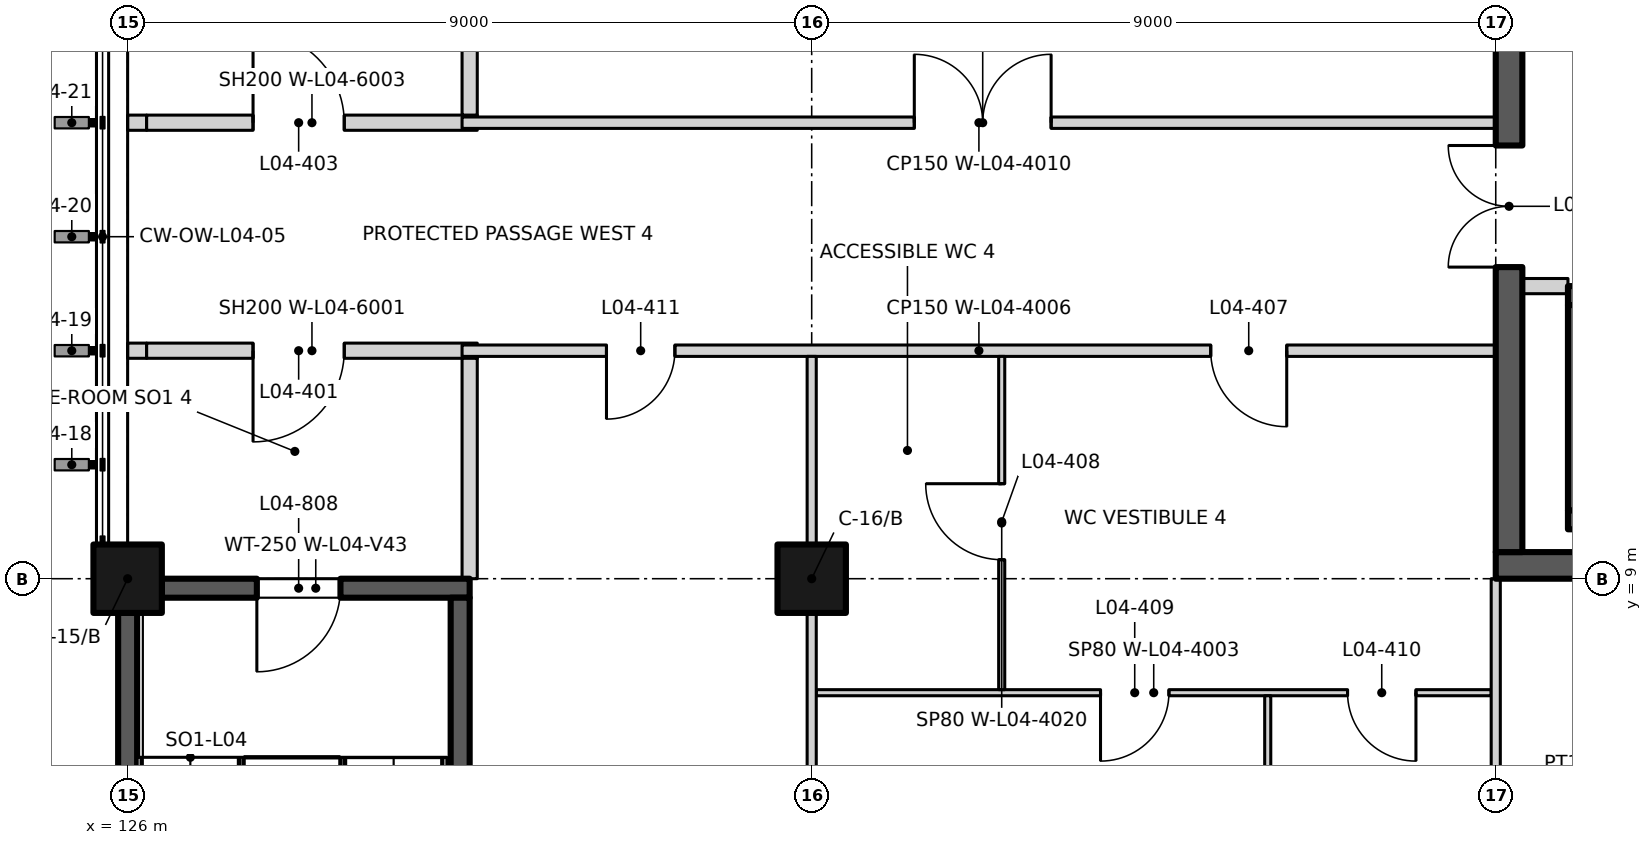
"""IFC4 building model, lengths in metres.
Left out: names, types, materials, properties, quantities, classifications, styles, units other than length and angle.
Written with IfcOpenShell. Run it as: python <this file> out.ifc"""

import sys

from ifc_helpers import new_model, si_unit, direction, frame, frame_2d, origin, origin_2d, place, context, subcontext, project, spatial, rectangle, extrude, element, fill, save


model = new_model("IFC4")
c1 = context("Model", 3, precision=1e-05, world=origin(), true_north=direction((0.0, 1.0)))
c2 = subcontext(c1, "Body", "Model", "MODEL_VIEW")
j1 = project(units=[si_unit("LENGTHUNIT", "METRE"), si_unit("PLANEANGLEUNIT", "RADIAN")], contexts=[c1])
p1 = place(None, origin())
s1 = spatial("IfcSite", under=j1, at=p1, CompositionType="ELEMENT")
p2 = place(p1, origin())
s2 = spatial("IfcBuilding", under=s1, at=p2, CompositionType="ELEMENT")
p3 = place(p2, frame((0.0, 0.0, 19.5)))
s3 = spatial("IfcBuildingStorey", under=s2, at=p3, CompositionType="ELEMENT", Elevation=19.5)
for number, where, z_axis, x_axis in (
    (1, (126.0, 9.0, 0.0), (0.0, 0.0, 1.0), (1.0, 0.0, 0.0)),
    (2, (135.0, 9.0, 0.0), (0.0, 0.0, 1.0), (1.0, 0.0, 0.0)),
):
    element("IfcColumn", number, at=place(p3, frame(where, z_axis=z_axis, x_axis=x_axis)), inside=s3, PredefinedType="COLUMN", context=c2, shape_type="SweptSolid", body=[
        extrude(rectangle(XDim=0.9, YDim=0.9, at=origin_2d()), origin(), (0.0, 0.0, 1.0), 4.5),
    ])
p4 = place(p3, frame((126.45, 8.875, 0.0), z_axis=(0.0, 0.0, 1.0), x_axis=(1.0, 0.0, 0.0)))
e3 = element("IfcWall", 3, at=p4, inside=s3, PredefinedType="SHEAR", context=c2, shape_type="SweptSolid", body=[
    extrude(rectangle(XDim=4.05, YDim=0.25, at=frame_2d((2.025, 0.0))), origin(), (0.0, 0.0, 1.0), 4.5),
])
p5 = place(p4, frame((2.35, 0.0, 0.0), z_axis=(0.0, 0.0, 1.0), x_axis=(-1.0, 0.0, 0.0)))
e4 = element("IfcOpeningElement", 4, at=p5, cuts=e3, PredefinedType="OPENING", context=c2, shape_type="SweptSolid", body=[
    extrude(rectangle(XDim=1.1, YDim=2.1, at=frame_2d((0.55, 1.05))), frame((0.0, 0.135, 0.0), z_axis=(0.0, -1.0, 0.0), x_axis=(1.0, 0.0, 0.0)), (0.0, 0.0, 1.0), 0.27),
])
p6 = place(p3, frame((126.0, 0.45, 0.0), z_axis=(0.0, 0.0, 1.0), x_axis=(0.0, 1.0, 0.0)))
e5 = element("IfcWall", 5, at=p6, inside=s3, PredefinedType="SHEAR", context=c2, shape_type="SweptSolid", body=[
    extrude(rectangle(XDim=8.1, YDim=0.25, at=frame_2d((4.05, 0.0))), origin(), (0.0, 0.0, 1.0), 4.5),
])
p7 = place(p3, frame((130.375, 0.125, 0.0), z_axis=(0.0, 0.0, 1.0), x_axis=(0.0, 1.0, 0.0)))
e6 = element("IfcWall", 6, at=p7, inside=s3, PredefinedType="SHEAR", context=c2, shape_type="SweptSolid", body=[
    extrude(rectangle(XDim=8.625, YDim=0.25, at=frame_2d((4.312, 0.0))), origin(), (0.0, 0.0, 1.0), 4.5),
])
p8 = place(p3, frame((144.95, 12.725, 0.0), z_axis=(0.0, 0.0, 1.0), x_axis=(1.0, 0.0, 0.0)))
e7 = element("IfcWall", 7, at=p8, inside=s3, PredefinedType="SHEAR", context=c2, shape_type="SweptSolid", body=[
    extrude(rectangle(XDim=12.05, YDim=0.25, at=frame_2d((6.025, 0.0))), origin(), (0.0, 0.0, 1.0), 4.5),
])
p9 = place(p8, frame((1.05, 0.0, 0.0)))
e8 = element("IfcOpeningElement", 8, at=p9, cuts=e7, PredefinedType="OPENING", context=c2, shape_type="SweptSolid", body=[
    extrude(rectangle(XDim=1.1, YDim=2.1, at=frame_2d((0.55, 1.05))), frame((0.0, 0.135, 0.0), z_axis=(0.0, -1.0, 0.0), x_axis=(1.0, 0.0, 0.0)), (0.0, 0.0, 1.0), 0.27),
])
p10 = place(p8, frame((4.0, 0.0, 0.0)))
e9 = element("IfcOpeningElement", 9, at=p10, cuts=e7, PredefinedType="OPENING", context=c2, shape_type="SweptSolid", body=[
    extrude(rectangle(XDim=1.1, YDim=2.1, at=frame_2d((0.55, 1.05))), frame((0.0, 0.135, 0.0), z_axis=(0.0, -1.0, 0.0), x_axis=(1.0, 0.0, 0.0)), (0.0, 0.0, 1.0), 0.27),
])
p11 = place(p8, frame((6.95, 0.0, 0.0)))
e10 = element("IfcOpeningElement", 10, at=p11, cuts=e7, PredefinedType="OPENING", context=c2, shape_type="SweptSolid", body=[
    extrude(rectangle(XDim=1.1, YDim=2.1, at=frame_2d((0.55, 1.05))), frame((0.0, 0.135, 0.0), z_axis=(0.0, -1.0, 0.0), x_axis=(1.0, 0.0, 0.0)), (0.0, 0.0, 1.0), 0.27),
])
p12 = place(p8, frame((9.9, 0.0, 0.0)))
e11 = element("IfcOpeningElement", 11, at=p12, cuts=e7, PredefinedType="OPENING", context=c2, shape_type="SweptSolid", body=[
    extrude(rectangle(XDim=1.1, YDim=2.1, at=frame_2d((0.55, 1.05))), frame((0.0, 0.135, 0.0), z_axis=(0.0, -1.0, 0.0), x_axis=(1.0, 0.0, 0.0)), (0.0, 0.0, 1.0), 0.27),
])
p13 = place(p3, frame((144.95, 9.775, 0.0), z_axis=(0.0, 0.0, 1.0), x_axis=(1.0, 0.0, 0.0)))
e12 = element("IfcWall", 12, at=p13, inside=s3, PredefinedType="SHEAR", context=c2, shape_type="SweptSolid", body=[
    extrude(rectangle(XDim=12.05, YDim=0.25, at=frame_2d((6.025, 0.0))), origin(), (0.0, 0.0, 1.0), 4.5),
])
p14 = place(p3, frame((145.075, 9.9, 0.0), z_axis=(0.0, 0.0, 1.0), x_axis=(0.0, 1.0, 0.0)))
e13 = element("IfcWall", 13, at=p14, inside=s3, PredefinedType="SHEAR", context=c2, shape_type="SweptSolid", body=[
    extrude(rectangle(XDim=2.7, YDim=0.25, at=frame_2d((1.35, 0.0))), origin(), (0.0, 0.0, 1.0), 4.5),
])
p15 = place(p3, frame((135.06, 7.5, 0.0), z_axis=(0.0, 0.0, 1.0), x_axis=(1.0, 0.0, 0.0)))
e14 = element("IfcWall", 14, at=p15, inside=s3, PredefinedType="PARTITIONING", context=c2, shape_type="SweptSolid", body=[
    extrude(rectangle(XDim=8.88, YDim=0.08, at=frame_2d((4.44, 0.0))), origin(), (0.0, 0.0, 1.0), 4.2),
])
p16 = place(p15, frame((4.64, 0.0, 0.0), z_axis=(0.0, 0.0, 1.0), x_axis=(-1.0, 0.0, 0.0)))
e15 = element("IfcOpeningElement", 15, at=p16, cuts=e14, PredefinedType="OPENING", context=c2, shape_type="SweptSolid", body=[
    extrude(rectangle(XDim=0.9, YDim=2.1, at=frame_2d((0.45, 1.05))), frame((0.0, 0.05, 0.0), z_axis=(0.0, -1.0, 0.0), x_axis=(1.0, 0.0, 0.0)), (0.0, 0.0, 1.0), 0.1),
])
p17 = place(p15, frame((7.89, 0.0, 0.0), z_axis=(0.0, 0.0, 1.0), x_axis=(-1.0, 0.0, 0.0)))
e16 = element("IfcOpeningElement", 16, at=p17, cuts=e14, PredefinedType="OPENING", context=c2, shape_type="SweptSolid", body=[
    extrude(rectangle(XDim=0.9, YDim=2.1, at=frame_2d((0.45, 1.05))), frame((0.0, 0.05, 0.0), z_axis=(0.0, -1.0, 0.0), x_axis=(1.0, 0.0, 0.0)), (0.0, 0.0, 1.0), 0.1),
])
p18 = place(p3, frame((144.0, 9.175, 0.0), z_axis=(0.0, 0.0, 1.0), x_axis=(1.0, 0.0, 0.0)))
e17 = element("IfcWall", 17, at=p18, inside=s3, PredefinedType="SHEAR", context=c2, shape_type="SweptSolid", body=[
    extrude(rectangle(XDim=18.0, YDim=0.35, at=frame_2d((9.0, 0.0))), origin(), (0.0, 0.0, 1.0), 4.2),
])
p19 = place(p18, frame((16.463, 0.0, 0.0), z_axis=(0.0, 0.0, 1.0), x_axis=(-1.0, 0.0, 0.0)))
e18 = element("IfcOpeningElement", 18, at=p19, cuts=e17, PredefinedType="OPENING", context=c2, shape_type="SweptSolid", body=[
    extrude(rectangle(XDim=2.1, YDim=2.4, at=frame_2d((1.05, 1.2))), frame((0.0, 0.185, 0.0), z_axis=(0.0, -1.0, 0.0), x_axis=(1.0, 0.0, 0.0)), (0.0, 0.0, 1.0), 0.37),
])
p20 = place(p3, frame((126.0, 12.0, 0.0), z_axis=(0.0, 0.0, 1.0), x_axis=(1.0, 0.0, 0.0)))
e19 = element("IfcWall", 19, at=p20, inside=s3, PredefinedType="PARTITIONING", context=c2, shape_type="SweptSolid", body=[
    extrude(rectangle(XDim=0.25, YDim=0.2, at=frame_2d((0.125, 0.0))), origin(), (0.0, 0.0, 1.0), 3.6),
])
p21 = place(p3, frame((126.25, 12.0, 0.0), z_axis=(0.0, 0.0, 1.0), x_axis=(1.0, 0.0, 0.0)))
e20 = element("IfcWall", 20, at=p21, inside=s3, PredefinedType="PARTITIONING", context=c2, shape_type="SweptSolid", body=[
    extrude(rectangle(XDim=4.35, YDim=0.2, at=frame_2d((2.175, 0.0))), origin(), (0.0, 0.0, 1.0), 4.2),
])
p22 = place(p21, frame((2.6, 0.0, 0.0), z_axis=(0.0, 0.0, 1.0), x_axis=(-1.0, 0.0, 0.0)))
e21 = element("IfcOpeningElement", 21, at=p22, cuts=e20, PredefinedType="OPENING", context=c2, shape_type="SweptSolid", body=[
    extrude(rectangle(XDim=1.2, YDim=2.1, at=frame_2d((0.6, 1.05))), frame((0.0, 0.11, 0.0), z_axis=(0.0, -1.0, 0.0), x_axis=(1.0, 0.0, 0.0)), (0.0, 0.0, 1.0), 0.22),
])
p23 = place(p3, frame((130.4, 12.0, 0.0), z_axis=(0.0, 0.0, 1.0), x_axis=(1.0, 0.0, 0.0)))
e22 = element("IfcWall", 22, at=p23, inside=s3, PredefinedType="PARTITIONING", context=c2, shape_type="SweptSolid", body=[
    extrude(rectangle(XDim=13.6, YDim=0.15, at=frame_2d((6.8, 0.0))), origin(), (0.0, 0.0, 1.0), 4.2),
])
p24 = place(p23, frame((10.85, 0.0, 0.0), z_axis=(0.0, 0.0, 1.0), x_axis=(-1.0, 0.0, 0.0)))
e23 = element("IfcOpeningElement", 23, at=p24, cuts=e22, PredefinedType="OPENING", context=c2, shape_type="SweptSolid", body=[
    extrude(rectangle(XDim=1.0, YDim=2.1, at=frame_2d((0.5, 1.05))), frame((0.0, 0.085, 0.0), z_axis=(0.0, -1.0, 0.0), x_axis=(1.0, 0.0, 0.0)), (0.0, 0.0, 1.0), 0.17),
])
p25 = place(p23, frame((2.8, 0.0, 0.0), z_axis=(0.0, 0.0, 1.0), x_axis=(-1.0, 0.0, 0.0)))
e24 = element("IfcOpeningElement", 24, at=p25, cuts=e22, PredefinedType="OPENING", context=c2, shape_type="SweptSolid", body=[
    extrude(rectangle(XDim=0.9, YDim=2.1, at=frame_2d((0.45, 1.05))), frame((0.0, 0.085, 0.0), z_axis=(0.0, -1.0, 0.0), x_axis=(1.0, 0.0, 0.0)), (0.0, 0.0, 1.0), 0.17),
])
p26 = place(p3, frame((144.35, 12.85, 0.0), z_axis=(0.0, 0.0, 1.0), x_axis=(1.0, 0.0, 0.0)))
e25 = element("IfcWall", 25, at=p26, inside=s3, PredefinedType="PARTITIONING", context=c2, shape_type="SweptSolid", body=[
    extrude(rectangle(XDim=0.6, YDim=0.2, at=frame_2d((0.3, 0.0))), origin(), (0.0, 0.0, 1.0), 4.2),
])
p27 = place(p3, frame((126.0, 15.0, 0.0), z_axis=(0.0, 0.0, 1.0), x_axis=(1.0, 0.0, 0.0)))
e26 = element("IfcWall", 26, at=p27, inside=s3, PredefinedType="PARTITIONING", context=c2, shape_type="SweptSolid", body=[
    extrude(rectangle(XDim=0.25, YDim=0.2, at=frame_2d((0.125, 0.0))), origin(), (0.0, 0.0, 1.0), 3.6),
])
p28 = place(p3, frame((126.25, 15.0, 0.0), z_axis=(0.0, 0.0, 1.0), x_axis=(1.0, 0.0, 0.0)))
e27 = element("IfcWall", 27, at=p28, inside=s3, PredefinedType="PARTITIONING", context=c2, shape_type="SweptSolid", body=[
    extrude(rectangle(XDim=4.35, YDim=0.2, at=frame_2d((2.175, 0.0))), origin(), (0.0, 0.0, 1.0), 4.2),
])
p29 = place(p28, frame((1.4, 0.0, 0.0)))
e28 = element("IfcOpeningElement", 28, at=p29, cuts=e27, PredefinedType="OPENING", context=c2, shape_type="SweptSolid", body=[
    extrude(rectangle(XDim=1.2, YDim=2.1, at=frame_2d((0.6, 1.05))), frame((0.0, 0.11, 0.0), z_axis=(0.0, -1.0, 0.0), x_axis=(1.0, 0.0, 0.0)), (0.0, 0.0, 1.0), 0.22),
])
p30 = place(p3, frame((130.4, 15.0, 0.0), z_axis=(0.0, 0.0, 1.0), x_axis=(1.0, 0.0, 0.0)))
e29 = element("IfcWall", 29, at=p30, inside=s3, PredefinedType="PARTITIONING", context=c2, shape_type="SweptSolid", body=[
    extrude(rectangle(XDim=13.6, YDim=0.15, at=frame_2d((6.8, 0.0))), origin(), (0.0, 0.0, 1.0), 4.2),
])
p31 = place(p30, frame((5.95, 0.0, 0.0)))
e30 = element("IfcOpeningElement", 30, at=p31, cuts=e29, PredefinedType="OPENING", context=c2, shape_type="SweptSolid", body=[
    extrude(rectangle(XDim=1.8, YDim=2.1, at=frame_2d((0.9, 1.05))), frame((0.0, 0.085, 0.0), z_axis=(0.0, -1.0, 0.0), x_axis=(1.0, 0.0, 0.0)), (0.0, 0.0, 1.0), 0.17),
])
for number, where, z_axis, x_axis in (
    (31, (130.5, 9.0, 0.0), (0.0, 0.0, 1.0), (0.0, 1.0, 0.0)),
    (32, (130.5, 15.1, 0.0), (0.0, 0.0, 1.0), (0.0, 1.0, 0.0)),
):
    element("IfcWall", number, at=place(p3, frame(where, z_axis=z_axis, x_axis=x_axis)), inside=s3, PredefinedType="PARTITIONING", context=c2, shape_type="SweptSolid", body=[
        extrude(rectangle(XDim=2.9, YDim=0.2, at=frame_2d((1.45, 0.0))), origin(), (0.0, 0.0, 1.0), 4.2),
    ])
p32 = place(p3, frame((135.0, 0.45, 0.0), z_axis=(0.0, 0.0, 1.0), x_axis=(0.0, 1.0, 0.0)))
e33 = element("IfcWall", 33, at=p32, inside=s3, PredefinedType="PARTITIONING", context=c2, shape_type="SweptSolid", body=[
    extrude(rectangle(XDim=8.1, YDim=0.12, at=frame_2d((4.05, 0.0))), origin(), (0.0, 0.0, 1.0), 4.2),
])
p33 = place(p3, frame((135.0, 9.45, 0.0), z_axis=(0.0, 0.0, 1.0), x_axis=(0.0, 1.0, 0.0)))
e34 = element("IfcWall", 34, at=p33, inside=s3, PredefinedType="PARTITIONING", context=c2, shape_type="SweptSolid", body=[
    extrude(rectangle(XDim=2.475, YDim=0.12, at=frame_2d((1.238, 0.0))), origin(), (0.0, 0.0, 1.0), 4.2),
])
p34 = place(p3, frame((137.5, 7.54, 0.0), z_axis=(0.0, 0.0, 1.0), x_axis=(0.0, 1.0, 0.0)))
e35 = element("IfcWall", 35, at=p34, inside=s3, PredefinedType="PARTITIONING", context=c2, shape_type="SweptSolid", body=[
    extrude(rectangle(XDim=4.385, YDim=0.08, at=frame_2d((2.192, 0.0))), origin(), (0.0, 0.0, 1.0), 4.2),
])
p35 = place(p34, frame((1.71, 0.0, 0.0)))
e36 = element("IfcOpeningElement", 36, at=p35, cuts=e35, PredefinedType="OPENING", context=c2, shape_type="SweptSolid", body=[
    extrude(rectangle(XDim=1.0, YDim=2.1, at=frame_2d((0.5, 1.05))), frame((0.0, 0.05, 0.0), z_axis=(0.0, -1.0, 0.0), x_axis=(1.0, 0.0, 0.0)), (0.0, 0.0, 1.0), 0.1),
])
p36 = place(p3, frame((141.0, 0.25, 0.0), z_axis=(0.0, 0.0, 1.0), x_axis=(0.0, 1.0, 0.0)))
e37 = element("IfcWall", 37, at=p36, inside=s3, PredefinedType="PARTITIONING", context=c2, shape_type="SweptSolid", body=[
    extrude(rectangle(XDim=7.21, YDim=0.08, at=frame_2d((3.605, 0.0))), origin(), (0.0, 0.0, 1.0), 4.2),
])
p37 = place(p3, frame((144.0, 0.45, 0.0), z_axis=(0.0, 0.0, 1.0), x_axis=(0.0, 1.0, 0.0)))
e38 = element("IfcWall", 38, at=p37, inside=s3, PredefinedType="PARTITIONING", context=c2, shape_type="SweptSolid", body=[
    extrude(rectangle(XDim=8.55, YDim=0.12, at=frame_2d((4.275, 0.0))), origin(), (0.0, 0.0, 1.0), 4.2),
])
p38 = place(p3, frame((144.175, 9.35, 0.0), z_axis=(0.0, 0.0, 1.0), x_axis=(0.0, 1.0, 0.0)))
e39 = element("IfcWall", 39, at=p38, inside=s3, PredefinedType="SHEAR", context=c2, shape_type="SweptSolid", body=[
    extrude(rectangle(XDim=17.4, YDim=0.35, at=frame_2d((8.7, 0.0))), origin(), (0.0, 0.0, 1.0), 4.2),
])
p39 = place(p38, frame((3.75, 0.0, 0.0)))
e40 = element("IfcOpeningElement", 40, at=p39, cuts=e39, PredefinedType="OPENING", context=c2, shape_type="SweptSolid", body=[
    extrude(rectangle(XDim=1.6, YDim=2.4, at=frame_2d((0.8, 1.2))), frame((0.0, 0.185, 0.0), z_axis=(0.0, -1.0, 0.0), x_axis=(1.0, 0.0, 0.0)), (0.0, 0.0, 1.0), 0.37),
])
p40 = place(p5, origin())
e41 = element("IfcDoor", 41, at=p40, inside=s3, OperationType="SINGLE_SWING_RIGHT", PredefinedType="DOOR", context=c2, shape_type="SweptSolid", body=[
    extrude(rectangle(XDim=1.1, YDim=2.1, at=frame_2d((0.55, 1.05))), frame((0.0, 0.025, 0.0), z_axis=(0.0, -1.0, 0.0), x_axis=(1.0, 0.0, 0.0)), (0.0, 0.0, 1.0), 0.05),
])
fill(e4, e41)
p41 = place(p22, origin())
e42 = element("IfcDoor", 42, at=p41, inside=s3, OperationType="SINGLE_SWING_RIGHT", PredefinedType="DOOR", context=c2, shape_type="SweptSolid", body=[
    extrude(rectangle(XDim=1.2, YDim=2.1, at=frame_2d((0.6, 1.05))), frame((0.0, 0.025, 0.0), z_axis=(0.0, -1.0, 0.0), x_axis=(1.0, 0.0, 0.0)), (0.0, 0.0, 1.0), 0.05),
])
fill(e21, e42)
p42 = place(p29, origin())
e43 = element("IfcDoor", 43, at=p42, inside=s3, OperationType="SINGLE_SWING_LEFT", PredefinedType="DOOR", context=c2, shape_type="SweptSolid", body=[
    extrude(rectangle(XDim=1.2, YDim=2.1, at=frame_2d((0.6, 1.05))), frame((0.0, 0.025, 0.0), z_axis=(0.0, -1.0, 0.0), x_axis=(1.0, 0.0, 0.0)), (0.0, 0.0, 1.0), 0.05),
])
fill(e28, e43)
p43 = place(p39, origin())
e44 = element("IfcDoor", 44, at=p43, inside=s3, OperationType="DOUBLE_DOOR_SINGLE_SWING", PredefinedType="DOOR", context=c2, shape_type="SweptSolid", body=[
    extrude(rectangle(XDim=1.6, YDim=2.4, at=frame_2d((0.8, 1.2))), frame((0.0, 0.025, 0.0), z_axis=(0.0, -1.0, 0.0), x_axis=(1.0, 0.0, 0.0)), (0.0, 0.0, 1.0), 0.05),
])
fill(e40, e44)
p44 = place(p24, origin())
e45 = element("IfcDoor", 45, at=p44, inside=s3, OperationType="SINGLE_SWING_LEFT", PredefinedType="DOOR", context=c2, shape_type="SweptSolid", body=[
    extrude(rectangle(XDim=1.0, YDim=2.1, at=frame_2d((0.5, 1.05))), frame((0.0, 0.025, 0.0), z_axis=(0.0, -1.0, 0.0), x_axis=(1.0, 0.0, 0.0)), (0.0, 0.0, 1.0), 0.05),
])
fill(e23, e45)
p45 = place(p35, origin())
e46 = element("IfcDoor", 46, at=p45, inside=s3, OperationType="SINGLE_SWING_RIGHT", PredefinedType="DOOR", context=c2, shape_type="SweptSolid", body=[
    extrude(rectangle(XDim=1.0, YDim=2.1, at=frame_2d((0.5, 1.05))), frame((0.0, 0.025, 0.0), z_axis=(0.0, -1.0, 0.0), x_axis=(1.0, 0.0, 0.0)), (0.0, 0.0, 1.0), 0.05),
])
fill(e36, e46)
p46 = place(p16, origin())
e47 = element("IfcDoor", 47, at=p46, inside=s3, OperationType="SINGLE_SWING_RIGHT", PredefinedType="DOOR", context=c2, shape_type="SweptSolid", body=[
    extrude(rectangle(XDim=0.9, YDim=2.1, at=frame_2d((0.45, 1.05))), frame((0.0, 0.025, 0.0), z_axis=(0.0, -1.0, 0.0), x_axis=(1.0, 0.0, 0.0)), (0.0, 0.0, 1.0), 0.05),
])
fill(e15, e47)
p47 = place(p17, origin())
e48 = element("IfcDoor", 48, at=p47, inside=s3, OperationType="SINGLE_SWING_LEFT", PredefinedType="DOOR", context=c2, shape_type="SweptSolid", body=[
    extrude(rectangle(XDim=0.9, YDim=2.1, at=frame_2d((0.45, 1.05))), frame((0.0, 0.025, 0.0), z_axis=(0.0, -1.0, 0.0), x_axis=(1.0, 0.0, 0.0)), (0.0, 0.0, 1.0), 0.05),
])
fill(e16, e48)
p48 = place(p25, origin())
e49 = element("IfcDoor", 49, at=p48, inside=s3, OperationType="SINGLE_SWING_RIGHT", PredefinedType="DOOR", context=c2, shape_type="SweptSolid", body=[
    extrude(rectangle(XDim=0.9, YDim=2.1, at=frame_2d((0.45, 1.05))), frame((0.0, 0.025, 0.0), z_axis=(0.0, -1.0, 0.0), x_axis=(1.0, 0.0, 0.0)), (0.0, 0.0, 1.0), 0.05),
])
fill(e24, e49)
p49 = place(p31, origin())
e50 = element("IfcDoor", 50, at=p49, inside=s3, OperationType="DOUBLE_DOOR_SINGLE_SWING", PredefinedType="DOOR", context=c2, shape_type="SweptSolid", body=[
    extrude(rectangle(XDim=1.8, YDim=2.1, at=frame_2d((0.9, 1.05))), frame((0.0, 0.025, 0.0), z_axis=(0.0, -1.0, 0.0), x_axis=(1.0, 0.0, 0.0)), (0.0, 0.0, 1.0), 0.05),
])
fill(e30, e50)
save(model, sys.argv[1])
